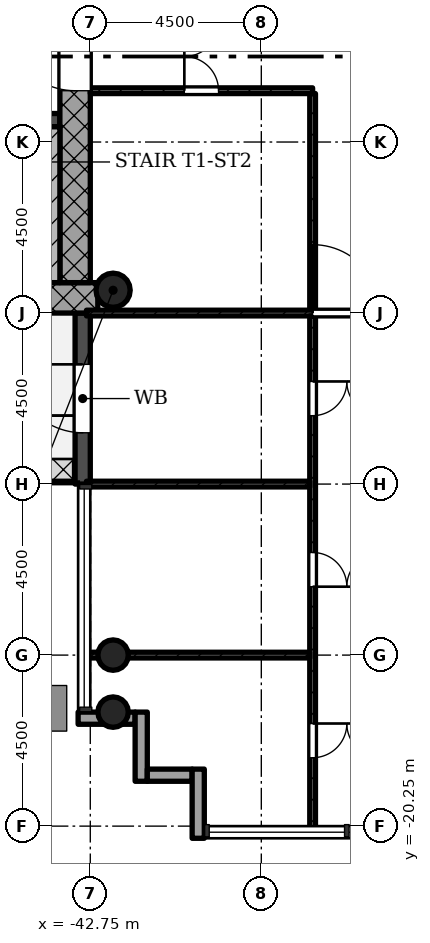
"""IFC4 building model, lengths in metres.
Left out: names, types, materials, properties, quantities, classifications, styles, units other than length and angle.
Written with IfcOpenShell. Run it as: python <this file> out.ifc"""

import sys

from ifc_helpers import new_model, si_unit, direction, frame, frame_2d, origin, origin_2d, place, context, subcontext, project, spatial, rectangle, hollow_circle, extrude, element, fill, save


model = new_model("IFC4")
c1 = context("Model", 3, precision=1e-05, world=origin(), true_north=direction((0.0, 1.0)))
c2 = subcontext(c1, "Body", "Model", "MODEL_VIEW")
j1 = project(units=[si_unit("LENGTHUNIT", "METRE"), si_unit("PLANEANGLEUNIT", "RADIAN")], contexts=[c1])
p1 = place(None, origin())
s1 = spatial("IfcSite", under=j1, at=p1, CompositionType="ELEMENT")
p2 = place(p1, origin())
s2 = spatial("IfcBuilding", under=s1, at=p2, CompositionType="ELEMENT")
p3 = place(p2, frame((0.0, 0.0, 128.7)))
s3 = spatial("IfcBuildingStorey", under=s2, at=p3, CompositionType="ELEMENT", Elevation=128.7)
p4 = place(p3, frame((-51.348, -6.35, 0.0), z_axis=(0.0, 0.0, 1.0), x_axis=(1.0, 0.0, 0.0)))
e1 = element("IfcWall", 1, at=p4, inside=s3, PredefinedType="SHEAR", context=c2, shape_type="SweptSolid", body=[
    extrude(rectangle(XDim=8.796, YDim=0.8, at=frame_2d((4.398, 0.0))), origin(), (0.0, 0.0, 1.0), 5.0),
])
p5 = place(p3, frame((-43.15, -5.95, 0.0), z_axis=(0.0, 0.0, 1.0), x_axis=(0.0, 1.0, 0.0)))
e2 = element("IfcWall", 2, at=p5, inside=s3, PredefinedType="SHEAR", context=c2, shape_type="SweptSolid", body=[
    extrude(rectangle(XDim=12.7, YDim=0.8, at=frame_2d((6.35, 0.0))), origin(), (0.0, 0.0, 1.0), 5.0),
])
p6 = place(p5, frame((5.05, 0.0, 0.0)))
e3 = element("IfcOpeningElement", 3, at=p6, cuts=e2, PredefinedType="OPENING", context=c2, shape_type="SweptSolid", body=[
    extrude(rectangle(XDim=1.8, YDim=2.1, at=frame_2d((0.9, 1.05))), frame((0.0, 0.41, 0.0), z_axis=(0.0, -1.0, 0.0), x_axis=(1.0, 0.0, 0.0)), (0.0, 0.0, 1.0), 0.82),
])
p7 = place(p3, frame((-50.95, -1.675, 0.0), z_axis=(0.0, 0.0, 1.0), x_axis=(1.0, 0.0, 0.0)))
e4 = element("IfcWall", 4, at=p7, inside=s3, PredefinedType="SHEAR", context=c2, shape_type="SweptSolid", body=[
    extrude(rectangle(XDim=7.4, YDim=0.35, at=frame_2d((3.7, 0.0))), origin(), (0.0, 0.0, 1.0), 5.0),
])
p8 = place(p7, frame((5.65, 0.0, 0.0)))
e5 = element("IfcOpeningElement", 5, at=p8, cuts=e4, PredefinedType="OPENING", context=c2, shape_type="SweptSolid", body=[
    extrude(rectangle(XDim=0.9, YDim=2.1, at=frame_2d((0.45, 1.05))), frame((0.0, 0.185, 0.0), z_axis=(0.0, -1.0, 0.0), x_axis=(1.0, 0.0, 0.0)), (0.0, 0.0, 1.0), 0.37),
])
for number, where, z_axis, x_axis in (
    (6, (-42.15, -15.75, 0.0), (0.0, 0.0, 1.0), (1.0, 0.0, 0.0)),
    (7, (-42.15, -17.25, 0.0), (0.0, 0.0, 1.0), (1.0, 0.0, 0.0)),
):
    element("IfcColumn", number, at=place(p3, frame(where, z_axis=z_axis, x_axis=x_axis)), inside=s3, PredefinedType="COLUMN", context=c2, shape_type="SweptSolid", body=[
        extrude(hollow_circle(Radius=0.4, WallThickness=0.028, at=origin_2d()), origin(), (0.0, 0.0, 1.0), 5.0),
    ])
p9 = place(p3, frame((-42.15, -6.15, 0.0), z_axis=(0.0, 0.0, 1.0), x_axis=(1.0, 0.0, 0.0)))
e8 = element("IfcColumn", 8, at=p9, inside=s3, PredefinedType="COLUMN", context=c2, shape_type="SweptSolid", body=[
    extrude(hollow_circle(Radius=0.45, WallThickness=0.032, at=origin_2d()), origin(), (0.0, 0.0, 1.0), 5.0),
])
p10 = place(p3, frame((-42.95, -6.75, -0.02), z_axis=(0.0, 0.0, 1.0), x_axis=(0.0, -1.0, 0.0)))
e9 = element("IfcWall", 9, at=p10, inside=s3, PredefinedType="STANDARD", context=c2, shape_type="SweptSolid", body=[
    extrude(rectangle(XDim=4.5, YDim=0.4, at=frame_2d((2.25, 0.0))), origin(), (0.0, 0.0, 1.0), 4.72),
])
p11 = place(p10, frame((1.35, 0.0, 0.02)))
e10 = element("IfcOpeningElement", 10, at=p11, cuts=e9, PredefinedType="OPENING", context=c2, shape_type="SweptSolid", body=[
    extrude(rectangle(XDim=1.8, YDim=2.1, at=frame_2d((0.9, 1.05))), frame((0.0, 0.21, 0.0), z_axis=(0.0, -1.0, 0.0), x_axis=(1.0, 0.0, 0.0)), (0.0, 0.0, 1.0), 0.42),
])
p12 = place(p3, frame((-43.07, -17.41, -0.3), z_axis=(0.0, 0.0, 1.0), x_axis=(1.0, 0.0, 0.0)))
e11 = element("IfcWall", 11, at=p12, inside=s3, PredefinedType="STANDARD", context=c2, shape_type="SweptSolid", body=[
    extrude(rectangle(XDim=1.5, YDim=0.32, at=frame_2d((0.75, 0.0))), origin(), (0.0, 0.0, 1.0), 5.0),
])
p13 = place(p3, frame((-41.41, -17.25, -0.3), z_axis=(0.0, 0.0, 1.0), x_axis=(0.0, -1.0, 0.0)))
e12 = element("IfcWall", 12, at=p13, inside=s3, PredefinedType="STANDARD", context=c2, shape_type="SweptSolid", body=[
    extrude(rectangle(XDim=1.82, YDim=0.32, at=frame_2d((0.91, 0.0))), origin(), (0.0, 0.0, 1.0), 5.0),
])
p14 = place(p3, frame((-41.25, -18.91, -0.3), z_axis=(0.0, 0.0, 1.0), x_axis=(1.0, 0.0, 0.0)))
e13 = element("IfcWall", 13, at=p14, inside=s3, PredefinedType="STANDARD", context=c2, shape_type="SweptSolid", body=[
    extrude(rectangle(XDim=1.18, YDim=0.32, at=frame_2d((0.59, 0.0))), origin(), (0.0, 0.0, 1.0), 5.0),
])
p15 = place(p3, frame((-39.91, -18.75, -0.3), z_axis=(0.0, 0.0, 1.0), x_axis=(0.0, -1.0, 0.0)))
e14 = element("IfcWall", 14, at=p15, inside=s3, PredefinedType="STANDARD", context=c2, shape_type="SweptSolid", body=[
    extrude(rectangle(XDim=1.82, YDim=0.32, at=frame_2d((0.91, 0.0))), origin(), (0.0, 0.0, 1.0), 5.0),
])
p16 = place(p3, frame((-42.75, -0.9, 0.0), z_axis=(0.0, 0.0, 1.0), x_axis=(1.0, 0.0, 0.0)))
e15 = element("IfcWall", 15, at=p16, inside=s3, PredefinedType="PARTITIONING", context=c2, shape_type="SweptSolid", body=[
    extrude(rectangle(XDim=5.85, YDim=0.15, at=frame_2d((2.925, 0.0))), origin(), (0.0, 0.0, 1.0), 4.58),
])
p17 = place(p16, frame((2.475, 0.0, 0.0)))
e16 = element("IfcOpeningElement", 16, at=p17, cuts=e15, PredefinedType="OPENING", context=c2, shape_type="SweptSolid", body=[
    extrude(rectangle(XDim=0.9, YDim=2.1, at=frame_2d((0.45, 1.05))), frame((0.0, 0.085, 0.0), z_axis=(0.0, -1.0, 0.0), x_axis=(1.0, 0.0, 0.0)), (0.0, 0.0, 1.0), 0.17),
])
p18 = place(p3, frame((-36.9, -6.675, 0.0), z_axis=(0.0, 0.0, 1.0), x_axis=(0.0, 1.0, 0.0)))
e17 = element("IfcWall", 17, at=p18, inside=s3, PredefinedType="PARTITIONING", context=c2, shape_type="SweptSolid", body=[
    extrude(rectangle(XDim=5.7, YDim=0.15, at=frame_2d((2.85, 0.0))), origin(), (0.0, 0.0, 1.0), 4.58),
])
p19 = place(p3, frame((-42.85, -6.75, 0.0), z_axis=(0.0, 0.0, 1.0), x_axis=(1.0, 0.0, 0.0)))
e18 = element("IfcWall", 18, at=p19, inside=s3, PredefinedType="PARTITIONING", context=c2, shape_type="SweptSolid", body=[
    extrude(rectangle(XDim=13.7, YDim=0.15, at=frame_2d((6.85, 0.0))), origin(), (0.0, 0.0, 1.0), 4.58),
])
p20 = place(p19, frame((5.95, 0.0, 0.0)))
e19 = element("IfcOpeningElement", 19, at=p20, cuts=e18, PredefinedType="OPENING", context=c2, shape_type="SweptSolid", body=[
    extrude(rectangle(XDim=1.8, YDim=2.1, at=frame_2d((0.9, 1.05))), frame((0.0, 0.085, 0.0), z_axis=(0.0, -1.0, 0.0), x_axis=(1.0, 0.0, 0.0)), (0.0, 0.0, 1.0), 0.17),
])
p21 = place(p3, frame((-36.9, -20.35, 0.0), z_axis=(0.0, 0.0, 1.0), x_axis=(0.0, 1.0, 0.0)))
e20 = element("IfcWall", 20, at=p21, inside=s3, PredefinedType="PARTITIONING", context=c2, shape_type="SweptSolid", body=[
    extrude(rectangle(XDim=13.525, YDim=0.15, at=frame_2d((6.763, 0.0))), origin(), (0.0, 0.0, 1.0), 4.58),
])
p22 = place(p21, frame((1.9, 0.0, 0.0)))
e21 = element("IfcOpeningElement", 21, at=p22, cuts=e20, PredefinedType="OPENING", context=c2, shape_type="SweptSolid", body=[
    extrude(rectangle(XDim=0.9, YDim=2.1, at=frame_2d((0.45, 1.05))), frame((0.0, 0.085, 0.0), z_axis=(0.0, -1.0, 0.0), x_axis=(1.0, 0.0, 0.0)), (0.0, 0.0, 1.0), 0.17),
])
p23 = place(p21, frame((6.4, 0.0, 0.0)))
e22 = element("IfcOpeningElement", 22, at=p23, cuts=e20, PredefinedType="OPENING", context=c2, shape_type="SweptSolid", body=[
    extrude(rectangle(XDim=0.9, YDim=2.1, at=frame_2d((0.45, 1.05))), frame((0.0, 0.085, 0.0), z_axis=(0.0, -1.0, 0.0), x_axis=(1.0, 0.0, 0.0)), (0.0, 0.0, 1.0), 0.17),
])
p24 = place(p21, frame((10.9, 0.0, 0.0)))
e23 = element("IfcOpeningElement", 23, at=p24, cuts=e20, PredefinedType="OPENING", context=c2, shape_type="SweptSolid", body=[
    extrude(rectangle(XDim=0.9, YDim=2.1, at=frame_2d((0.45, 1.05))), frame((0.0, 0.085, 0.0), z_axis=(0.0, -1.0, 0.0), x_axis=(1.0, 0.0, 0.0)), (0.0, 0.0, 1.0), 0.17),
])
for number, where, z_axis, x_axis in (
    (24, (-36.975, -15.75, 0.0), (0.0, 0.0, 1.0), (-1.0, 0.0, 0.0)),
    (25, (-36.975, -11.25, 0.0), (0.0, 0.0, 1.0), (-1.0, 0.0, 0.0)),
):
    element("IfcWall", number, at=place(p3, frame(where, z_axis=z_axis, x_axis=x_axis)), inside=s3, PredefinedType="PARTITIONING", context=c2, shape_type="SweptSolid", body=[
        extrude(rectangle(XDim=5.875, YDim=0.15, at=frame_2d((2.938, 0.0))), origin(), (0.0, 0.0, 1.0), 4.58),
    ])
p25 = place(p3, frame((-43.75, -1.85, 0.0), z_axis=(0.0, 0.0, 1.0), x_axis=(0.0, -1.0, 0.0)))
e26 = element("IfcWall", 26, at=p25, inside=s3, PredefinedType="SHEAR", context=c2, shape_type="SweptSolid", body=[
    extrude(rectangle(XDim=4.1, YDim=0.4, at=frame_2d((2.05, 0.0))), origin(), (0.0, 0.0, 1.0), 5.0),
])
p26 = place(p11, origin())
e27 = element("IfcDoor", 27, at=p26, inside=s3, OperationType="SINGLE_SWING_LEFT", PredefinedType="DOOR", context=c2, shape_type="SweptSolid", body=[
    extrude(rectangle(XDim=1.8, YDim=2.1, at=frame_2d((0.9, 1.05))), frame((0.0, 0.025, 0.0), z_axis=(0.0, -1.0, 0.0), x_axis=(1.0, 0.0, 0.0)), (0.0, 0.0, 1.0), 0.05),
])
fill(e10, e27)
p27 = place(p17, origin())
e28 = element("IfcDoor", 28, at=p27, inside=s3, OperationType="SINGLE_SWING_RIGHT", PredefinedType="DOOR", context=c2, shape_type="SweptSolid", body=[
    extrude(rectangle(XDim=0.9, YDim=2.1, at=frame_2d((0.45, 1.05))), frame((0.0, 0.025, 0.0), z_axis=(0.0, -1.0, 0.0), x_axis=(1.0, 0.0, 0.0)), (0.0, 0.0, 1.0), 0.05),
])
fill(e16, e28)
p28 = place(p20, origin())
e29 = element("IfcDoor", 29, at=p28, inside=s3, OperationType="SINGLE_SWING_RIGHT", PredefinedType="DOOR", context=c2, shape_type="SweptSolid", body=[
    extrude(rectangle(XDim=1.8, YDim=2.1, at=frame_2d((0.9, 1.05))), frame((0.0, 0.025, 0.0), z_axis=(0.0, -1.0, 0.0), x_axis=(1.0, 0.0, 0.0)), (0.0, 0.0, 1.0), 0.05),
])
fill(e19, e29)
p29 = place(p22, origin())
e30 = element("IfcDoor", 30, at=p29, inside=s3, OperationType="SINGLE_SWING_RIGHT", PredefinedType="DOOR", context=c2, shape_type="SweptSolid", body=[
    extrude(rectangle(XDim=0.9, YDim=2.1, at=frame_2d((0.45, 1.05))), frame((0.0, 0.025, 0.0), z_axis=(0.0, -1.0, 0.0), x_axis=(1.0, 0.0, 0.0)), (0.0, 0.0, 1.0), 0.05),
])
fill(e21, e30)
p30 = place(p23, origin())
e31 = element("IfcDoor", 31, at=p30, inside=s3, OperationType="SINGLE_SWING_LEFT", PredefinedType="DOOR", context=c2, shape_type="SweptSolid", body=[
    extrude(rectangle(XDim=0.9, YDim=2.1, at=frame_2d((0.45, 1.05))), frame((0.0, 0.025, 0.0), z_axis=(0.0, -1.0, 0.0), x_axis=(1.0, 0.0, 0.0)), (0.0, 0.0, 1.0), 0.05),
])
fill(e22, e31)
p31 = place(p24, origin())
e32 = element("IfcDoor", 32, at=p31, inside=s3, OperationType="SINGLE_SWING_RIGHT", PredefinedType="DOOR", context=c2, shape_type="SweptSolid", body=[
    extrude(rectangle(XDim=0.9, YDim=2.1, at=frame_2d((0.45, 1.05))), frame((0.0, 0.025, 0.0), z_axis=(0.0, -1.0, 0.0), x_axis=(1.0, 0.0, 0.0)), (0.0, 0.0, 1.0), 0.05),
])
fill(e23, e32)
p32 = place(p6, origin())
e33 = element("IfcDoor", 33, at=p32, inside=s3, OperationType="SINGLE_SWING_LEFT", PredefinedType="DOOR", context=c2, shape_type="SweptSolid", body=[
    extrude(rectangle(XDim=1.8, YDim=2.1, at=frame_2d((0.9, 1.05))), frame((0.0, 0.025, 0.0), z_axis=(0.0, -1.0, 0.0), x_axis=(1.0, 0.0, 0.0)), (0.0, 0.0, 1.0), 0.05),
])
fill(e3, e33)
save(model, sys.argv[1])
